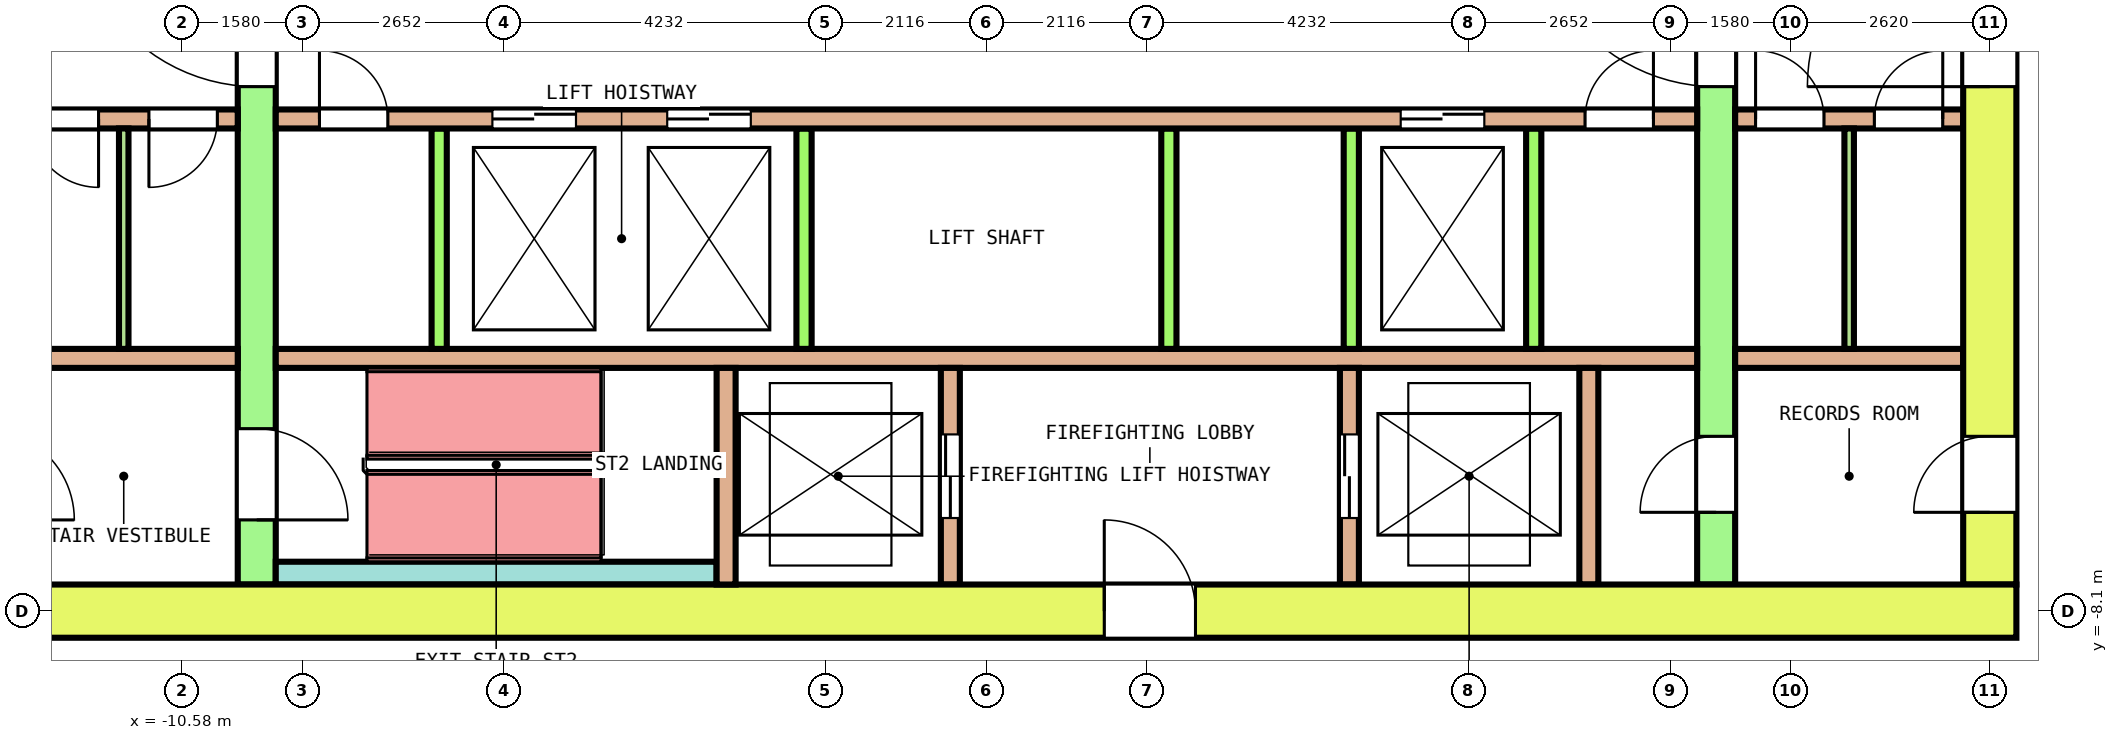
"""IFC4 building model, lengths in metres.
Left out: names, types, materials, properties, quantities, classifications, styles, units other than length and angle.
Written with IfcOpenShell. Run it as: python <this file> out.ifc"""

import sys

from ifc_helpers import new_model, si_unit, direction, frame, frame_2d, origin, place, context, subcontext, project, spatial, rectangle, extrude, element, fill, save


model = new_model("IFC4")
c1 = context("Model", 3, precision=1e-05, world=origin(), true_north=direction((0.0, 1.0)))
c2 = subcontext(c1, "Body", "Model", "MODEL_VIEW")
j1 = project(units=[si_unit("LENGTHUNIT", "METRE"), si_unit("PLANEANGLEUNIT", "RADIAN")], contexts=[c1])
p1 = place(None, origin())
s1 = spatial("IfcSite", under=j1, at=p1, CompositionType="ELEMENT")
p2 = place(p1, origin())
s2 = spatial("IfcBuilding", under=s1, at=p2, CompositionType="ELEMENT")
p3 = place(p2, frame((0.0, 0.0, 198.0)))
s3 = spatial("IfcBuildingStorey", under=s2, at=p3, CompositionType="ELEMENT", Elevation=198.0)
p4 = place(p3, frame((-13.55, -8.1, 0.0), z_axis=(0.0, 0.0, 1.0), x_axis=(1.0, 0.0, 0.0)))
e1 = element("IfcWall", 1, at=p4, inside=s3, PredefinedType="SHEAR", context=c2, shape_type="SweptSolid", body=[
    extrude(rectangle(XDim=27.1, YDim=0.7, at=frame_2d((13.55, 0.0))), origin(), (0.0, 0.0, 1.0), 4.1),
])
p5 = place(p4, frame((15.1, 0.0, 0.0)))
e2 = element("IfcOpeningElement", 2, at=p5, cuts=e1, PredefinedType="OPENING", context=c2, shape_type="SweptSolid", body=[
    extrude(rectangle(XDim=1.2, YDim=2.1, at=frame_2d((0.6, 1.05))), frame((0.0, 0.36, 0.0), z_axis=(0.0, -1.0, 0.0), x_axis=(1.0, 0.0, 0.0)), (0.0, 0.0, 1.0), 0.72),
])
p6 = place(p3, frame((13.2, -7.75, 0.0), z_axis=(0.0, 0.0, 1.0), x_axis=(0.0, 1.0, 0.0)))
e3 = element("IfcWall", 3, at=p6, inside=s3, PredefinedType="SHEAR", context=c2, shape_type="SweptSolid", body=[
    extrude(rectangle(XDim=15.5, YDim=0.7, at=frame_2d((7.75, 0.0))), origin(), (0.0, 0.0, 1.0), 4.1),
])
p7 = place(p6, frame((6.55, 0.0, 0.0)))
e4 = element("IfcOpeningElement", 4, at=p7, cuts=e3, PredefinedType="OPENING", context=c2, shape_type="SweptSolid", body=[
    extrude(rectangle(XDim=2.4, YDim=2.1, at=frame_2d((1.2, 1.05))), frame((0.0, 0.36, 0.0), z_axis=(0.0, -1.0, 0.0), x_axis=(1.0, 0.0, 0.0)), (0.0, 0.0, 1.0), 0.72),
])
p8 = place(p6, frame((13.45, 0.0, 0.0)))
e5 = element("IfcOpeningElement", 5, at=p8, cuts=e3, PredefinedType="OPENING", context=c2, shape_type="SweptSolid", body=[
    extrude(rectangle(XDim=1.2, YDim=2.1, at=frame_2d((0.6, 1.05))), frame((0.0, 0.36, 0.0), z_axis=(0.0, -1.0, 0.0), x_axis=(1.0, 0.0, 0.0)), (0.0, 0.0, 1.0), 0.72),
])
p9 = place(p6, frame((0.95, 0.0, 0.0)))
e6 = element("IfcOpeningElement", 6, at=p9, cuts=e3, PredefinedType="OPENING", context=c2, shape_type="SweptSolid", body=[
    extrude(rectangle(XDim=1.0, YDim=2.1, at=frame_2d((0.5, 1.05))), frame((0.0, 0.36, 0.0), z_axis=(0.0, -1.0, 0.0), x_axis=(1.0, 0.0, 0.0)), (0.0, 0.0, 1.0), 0.72),
])
p10 = place(p3, frame((-9.6, -7.75, 0.0), z_axis=(0.0, 0.0, 1.0), x_axis=(0.0, 1.0, 0.0)))
e7 = element("IfcWall", 7, at=p10, inside=s3, PredefinedType="SHEAR", context=c2, shape_type="SweptSolid", body=[
    extrude(rectangle(XDim=15.5, YDim=0.5, at=frame_2d((7.75, 0.0))), origin(), (0.0, 0.0, 1.0), 4.1),
])
p11 = place(p10, frame((6.55, 0.0, 0.0)))
e8 = element("IfcOpeningElement", 8, at=p11, cuts=e7, PredefinedType="OPENING", context=c2, shape_type="SweptSolid", body=[
    extrude(rectangle(XDim=2.4, YDim=2.1, at=frame_2d((1.2, 1.05))), frame((0.0, 0.26, 0.0), z_axis=(0.0, -1.0, 0.0), x_axis=(1.0, 0.0, 0.0)), (0.0, 0.0, 1.0), 0.52),
])
p12 = place(p10, frame((13.45, 0.0, 0.0)))
e9 = element("IfcOpeningElement", 9, at=p12, cuts=e7, PredefinedType="OPENING", context=c2, shape_type="SweptSolid", body=[
    extrude(rectangle(XDim=1.2, YDim=2.1, at=frame_2d((0.6, 1.05))), frame((0.0, 0.26, 0.0), z_axis=(0.0, -1.0, 0.0), x_axis=(1.0, 0.0, 0.0)), (0.0, 0.0, 1.0), 0.52),
])
p13 = place(p10, frame((0.85, 0.0, 0.0)))
e10 = element("IfcOpeningElement", 10, at=p13, cuts=e7, PredefinedType="OPENING", context=c2, shape_type="SweptSolid", body=[
    extrude(rectangle(XDim=1.2, YDim=2.1, at=frame_2d((0.6, 1.05))), frame((0.0, 0.26, 0.0), z_axis=(0.0, -1.0, 0.0), x_axis=(1.0, 0.0, 0.0)), (0.0, 0.0, 1.0), 0.52),
])
p14 = place(p3, frame((9.6, -7.75, 0.0), z_axis=(0.0, 0.0, 1.0), x_axis=(0.0, 1.0, 0.0)))
e11 = element("IfcWall", 11, at=p14, inside=s3, PredefinedType="SHEAR", context=c2, shape_type="SweptSolid", body=[
    extrude(rectangle(XDim=15.5, YDim=0.5, at=frame_2d((7.75, 0.0))), origin(), (0.0, 0.0, 1.0), 4.1),
])
p15 = place(p14, frame((6.55, 0.0, 0.0)))
e12 = element("IfcOpeningElement", 12, at=p15, cuts=e11, PredefinedType="OPENING", context=c2, shape_type="SweptSolid", body=[
    extrude(rectangle(XDim=2.4, YDim=2.1, at=frame_2d((1.2, 1.05))), frame((0.0, 0.26, 0.0), z_axis=(0.0, -1.0, 0.0), x_axis=(1.0, 0.0, 0.0)), (0.0, 0.0, 1.0), 0.52),
])
p16 = place(p14, frame((13.45, 0.0, 0.0)))
e13 = element("IfcOpeningElement", 13, at=p16, cuts=e11, PredefinedType="OPENING", context=c2, shape_type="SweptSolid", body=[
    extrude(rectangle(XDim=1.2, YDim=2.1, at=frame_2d((0.6, 1.05))), frame((0.0, 0.26, 0.0), z_axis=(0.0, -1.0, 0.0), x_axis=(1.0, 0.0, 0.0)), (0.0, 0.0, 1.0), 0.52),
])
p17 = place(p14, frame((0.95, 0.0, 0.0)))
e14 = element("IfcOpeningElement", 14, at=p17, cuts=e11, PredefinedType="OPENING", context=c2, shape_type="SweptSolid", body=[
    extrude(rectangle(XDim=1.0, YDim=2.1, at=frame_2d((0.5, 1.05))), frame((0.0, 0.26, 0.0), z_axis=(0.0, -1.0, 0.0), x_axis=(1.0, 0.0, 0.0)), (0.0, 0.0, 1.0), 0.52),
])
p18 = place(p3, frame((-12.85, -1.625, 0.0), z_axis=(0.0, 0.0, 1.0), x_axis=(1.0, 0.0, 0.0)))
e15 = element("IfcWall", 15, at=p18, inside=s3, PredefinedType="SOLIDWALL", context=c2, shape_type="SweptSolid", body=[
    extrude(rectangle(XDim=3.0, YDim=0.25, at=frame_2d((1.5, 0.0))), origin(), (0.0, 0.0, 1.0), 4.1),
])
p19 = place(p18, frame((0.269, 0.0, 0.0)))
e16 = element("IfcOpeningElement", 16, at=p19, cuts=e15, PredefinedType="OPENING", context=c2, shape_type="SweptSolid", body=[
    extrude(rectangle(XDim=0.9, YDim=2.1, at=frame_2d((0.45, 1.05))), frame((0.0, 0.135, 0.0), z_axis=(0.0, -1.0, 0.0), x_axis=(1.0, 0.0, 0.0)), (0.0, 0.0, 1.0), 0.27),
])
p20 = place(p18, frame((1.831, 0.0, 0.0)))
e17 = element("IfcOpeningElement", 17, at=p20, cuts=e15, PredefinedType="OPENING", context=c2, shape_type="SweptSolid", body=[
    extrude(rectangle(XDim=0.9, YDim=2.1, at=frame_2d((0.45, 1.05))), frame((0.0, 0.135, 0.0), z_axis=(0.0, -1.0, 0.0), x_axis=(1.0, 0.0, 0.0)), (0.0, 0.0, 1.0), 0.27),
])
p21 = place(p3, frame((-9.35, -1.625, 0.0), z_axis=(0.0, 0.0, 1.0), x_axis=(1.0, 0.0, 0.0)))
e18 = element("IfcWall", 18, at=p21, inside=s3, PredefinedType="SOLIDWALL", context=c2, shape_type="SweptSolid", body=[
    extrude(rectangle(XDim=18.7, YDim=0.25, at=frame_2d((9.35, 0.0))), origin(), (0.0, 0.0, 1.0), 4.1),
])
p22 = place(p21, frame((2.85, 0.0, 0.0)))
e19 = element("IfcOpeningElement", 19, at=p22, cuts=e18, PredefinedType="OPENING", context=c2, shape_type="SweptSolid", body=[
    extrude(rectangle(XDim=1.1, YDim=2.1, at=frame_2d((0.55, 1.05))), frame((0.0, 0.135, 0.0), z_axis=(0.0, -1.0, 0.0), x_axis=(1.0, 0.0, 0.0)), (0.0, 0.0, 1.0), 0.27),
])
p23 = place(p21, frame((5.15, 0.0, 0.0)))
e20 = element("IfcOpeningElement", 20, at=p23, cuts=e18, PredefinedType="OPENING", context=c2, shape_type="SweptSolid", body=[
    extrude(rectangle(XDim=1.1, YDim=2.1, at=frame_2d((0.55, 1.05))), frame((0.0, 0.135, 0.0), z_axis=(0.0, -1.0, 0.0), x_axis=(1.0, 0.0, 0.0)), (0.0, 0.0, 1.0), 0.27),
])
p24 = place(p21, frame((14.8, 0.0, 0.0)))
e21 = element("IfcOpeningElement", 21, at=p24, cuts=e18, PredefinedType="OPENING", context=c2, shape_type="SweptSolid", body=[
    extrude(rectangle(XDim=1.1, YDim=2.1, at=frame_2d((0.55, 1.05))), frame((0.0, 0.135, 0.0), z_axis=(0.0, -1.0, 0.0), x_axis=(1.0, 0.0, 0.0)), (0.0, 0.0, 1.0), 0.27),
])
p25 = place(p21, frame((0.575, 0.0, 0.0)))
e22 = element("IfcOpeningElement", 22, at=p25, cuts=e18, PredefinedType="OPENING", context=c2, shape_type="SweptSolid", body=[
    extrude(rectangle(XDim=0.9, YDim=2.1, at=frame_2d((0.45, 1.05))), frame((0.0, 0.135, 0.0), z_axis=(0.0, -1.0, 0.0), x_axis=(1.0, 0.0, 0.0)), (0.0, 0.0, 1.0), 0.27),
])
p26 = place(p21, frame((17.225, 0.0, 0.0)))
e23 = element("IfcOpeningElement", 23, at=p26, cuts=e18, PredefinedType="OPENING", context=c2, shape_type="SweptSolid", body=[
    extrude(rectangle(XDim=0.9, YDim=2.1, at=frame_2d((0.45, 1.05))), frame((0.0, 0.135, 0.0), z_axis=(0.0, -1.0, 0.0), x_axis=(1.0, 0.0, 0.0)), (0.0, 0.0, 1.0), 0.27),
])
p27 = place(p3, frame((9.85, -1.625, 0.0), z_axis=(0.0, 0.0, 1.0), x_axis=(1.0, 0.0, 0.0)))
e24 = element("IfcWall", 24, at=p27, inside=s3, PredefinedType="SOLIDWALL", context=c2, shape_type="SweptSolid", body=[
    extrude(rectangle(XDim=3.0, YDim=0.25, at=frame_2d((1.5, 0.0))), origin(), (0.0, 0.0, 1.0), 4.1),
])
p28 = place(p27, frame((0.269, 0.0, 0.0)))
e25 = element("IfcOpeningElement", 25, at=p28, cuts=e24, PredefinedType="OPENING", context=c2, shape_type="SweptSolid", body=[
    extrude(rectangle(XDim=0.9, YDim=2.1, at=frame_2d((0.45, 1.05))), frame((0.0, 0.135, 0.0), z_axis=(0.0, -1.0, 0.0), x_axis=(1.0, 0.0, 0.0)), (0.0, 0.0, 1.0), 0.27),
])
p29 = place(p27, frame((1.831, 0.0, 0.0)))
e26 = element("IfcOpeningElement", 26, at=p29, cuts=e24, PredefinedType="OPENING", context=c2, shape_type="SweptSolid", body=[
    extrude(rectangle(XDim=0.9, YDim=2.1, at=frame_2d((0.45, 1.05))), frame((0.0, 0.135, 0.0), z_axis=(0.0, -1.0, 0.0), x_axis=(1.0, 0.0, 0.0)), (0.0, 0.0, 1.0), 0.27),
])
p30 = place(p3, frame((-12.85, -4.775, 0.0), z_axis=(0.0, 0.0, 1.0), x_axis=(1.0, 0.0, 0.0)))
e27 = element("IfcWall", 27, at=p30, inside=s3, PredefinedType="SOLIDWALL", context=c2, shape_type="SweptSolid", body=[
    extrude(rectangle(XDim=3.0, YDim=0.25, at=frame_2d((1.5, 0.0))), origin(), (0.0, 0.0, 1.0), 4.1),
])
p31 = place(p3, frame((-9.35, -4.775, 0.0), z_axis=(0.0, 0.0, 1.0), x_axis=(1.0, 0.0, 0.0)))
e28 = element("IfcWall", 28, at=p31, inside=s3, PredefinedType="SOLIDWALL", context=c2, shape_type="SweptSolid", body=[
    extrude(rectangle(XDim=18.7, YDim=0.25, at=frame_2d((9.35, 0.0))), origin(), (0.0, 0.0, 1.0), 4.1),
])
p32 = place(p3, frame((9.85, -4.775, 0.0), z_axis=(0.0, 0.0, 1.0), x_axis=(1.0, 0.0, 0.0)))
e29 = element("IfcWall", 29, at=p32, inside=s3, PredefinedType="SOLIDWALL", context=c2, shape_type="SweptSolid", body=[
    extrude(rectangle(XDim=3.0, YDim=0.25, at=frame_2d((1.5, 0.0))), origin(), (0.0, 0.0, 1.0), 4.1),
])
for number, where, z_axis, x_axis in (
    (30, (-7.2, -4.65, 0.0), (0.0, 0.0, 1.0), (0.0, 1.0, 0.0)),
    (31, (-2.4, -4.65, 0.0), (0.0, 0.0, 1.0), (0.0, 1.0, 0.0)),
    (32, (2.4, -4.65, 0.0), (0.0, 0.0, 1.0), (0.0, 1.0, 0.0)),
    (33, (4.8, -4.65, 0.0), (0.0, 0.0, 1.0), (0.0, 1.0, 0.0)),
    (34, (7.2, -4.65, 0.0), (0.0, 0.0, 1.0), (0.0, 1.0, 0.0)),
):
    element("IfcWall", number, at=place(p3, frame(where, z_axis=z_axis, x_axis=x_axis)), inside=s3, PredefinedType="SOLIDWALL", context=c2, shape_type="SweptSolid", body=[
        extrude(rectangle(XDim=2.9, YDim=0.2, at=frame_2d((1.45, 0.0))), origin(), (0.0, 0.0, 1.0), 4.1),
    ])
p33 = place(p3, frame((-9.35, -7.6, 0.0), z_axis=(0.0, 0.0, 1.0), x_axis=(1.0, 0.0, 0.0)))
e35 = element("IfcWall", 35, at=p33, inside=s3, PredefinedType="SOLIDWALL", context=c2, shape_type="SweptSolid", body=[
    extrude(rectangle(XDim=5.8, YDim=0.3, at=frame_2d((2.9, 0.0))), origin(), (0.0, 0.0, 1.0), 4.1),
])
p34 = place(p3, frame((-3.425, -7.75, 0.0), z_axis=(0.0, 0.0, 1.0), x_axis=(0.0, 1.0, 0.0)))
e36 = element("IfcWall", 36, at=p34, inside=s3, PredefinedType="SOLIDWALL", context=c2, shape_type="SweptSolid", body=[
    extrude(rectangle(XDim=2.85, YDim=0.25, at=frame_2d((1.425, 0.0))), origin(), (0.0, 0.0, 1.0), 4.1),
])
p35 = place(p3, frame((-0.475, -7.75, 0.0), z_axis=(0.0, 0.0, 1.0), x_axis=(0.0, 1.0, 0.0)))
e37 = element("IfcWall", 37, at=p35, inside=s3, PredefinedType="SOLIDWALL", context=c2, shape_type="SweptSolid", body=[
    extrude(rectangle(XDim=2.85, YDim=0.25, at=frame_2d((1.425, 0.0))), origin(), (0.0, 0.0, 1.0), 4.1),
])
p36 = place(p35, frame((0.875, 0.0, 0.0)))
e38 = element("IfcOpeningElement", 38, at=p36, cuts=e37, PredefinedType="OPENING", context=c2, shape_type="SweptSolid", body=[
    extrude(rectangle(XDim=1.1, YDim=2.1, at=frame_2d((0.55, 1.05))), frame((0.0, 0.135, 0.0), z_axis=(0.0, -1.0, 0.0), x_axis=(1.0, 0.0, 0.0)), (0.0, 0.0, 1.0), 0.27),
])
p37 = place(p3, frame((4.775, -7.75, 0.0), z_axis=(0.0, 0.0, 1.0), x_axis=(0.0, 1.0, 0.0)))
e39 = element("IfcWall", 39, at=p37, inside=s3, PredefinedType="SOLIDWALL", context=c2, shape_type="SweptSolid", body=[
    extrude(rectangle(XDim=2.85, YDim=0.25, at=frame_2d((1.425, 0.0))), origin(), (0.0, 0.0, 1.0), 4.1),
])
p38 = place(p37, frame((0.875, 0.0, 0.0)))
e40 = element("IfcOpeningElement", 40, at=p38, cuts=e39, PredefinedType="OPENING", context=c2, shape_type="SweptSolid", body=[
    extrude(rectangle(XDim=1.1, YDim=2.1, at=frame_2d((0.55, 1.05))), frame((0.0, 0.135, 0.0), z_axis=(0.0, -1.0, 0.0), x_axis=(1.0, 0.0, 0.0)), (0.0, 0.0, 1.0), 0.27),
])
p39 = place(p3, frame((7.925, -7.75, 0.0), z_axis=(0.0, 0.0, 1.0), x_axis=(0.0, 1.0, 0.0)))
e41 = element("IfcWall", 41, at=p39, inside=s3, PredefinedType="SOLIDWALL", context=c2, shape_type="SweptSolid", body=[
    extrude(rectangle(XDim=2.85, YDim=0.25, at=frame_2d((1.425, 0.0))), origin(), (0.0, 0.0, 1.0), 4.1),
])
for number, where, z_axis, x_axis in (
    (42, (-11.35, -4.65, 0.0), (0.0, 0.0, 1.0), (0.0, 1.0, 0.0)),
    (43, (11.35, -4.65, 0.0), (0.0, 0.0, 1.0), (0.0, 1.0, 0.0)),
):
    element("IfcWall", number, at=place(p3, frame(where, z_axis=z_axis, x_axis=x_axis)), inside=s3, PredefinedType="PARTITIONING", context=c2, shape_type="SweptSolid", body=[
        extrude(rectangle(XDim=2.9, YDim=0.125, at=frame_2d((1.45, 0.0))), origin(), (0.0, 0.0, 1.0), 4.1),
    ])
p40 = place(p22, origin())
e44 = element("IfcDoor", 44, at=p40, inside=s3, OperationType="DOUBLE_DOOR_SLIDING", PredefinedType="DOOR", context=c2, shape_type="SweptSolid", body=[
    extrude(rectangle(XDim=1.1, YDim=2.1, at=frame_2d((0.55, 1.05))), frame((0.0, 0.075, 0.0), z_axis=(0.0, -1.0, 0.0), x_axis=(1.0, 0.0, 0.0)), (0.0, 0.0, 1.0), 0.15),
])
fill(e19, e44)
p41 = place(p23, origin())
e45 = element("IfcDoor", 45, at=p41, inside=s3, OperationType="DOUBLE_DOOR_SLIDING", PredefinedType="DOOR", context=c2, shape_type="SweptSolid", body=[
    extrude(rectangle(XDim=1.1, YDim=2.1, at=frame_2d((0.55, 1.05))), frame((0.0, 0.075, 0.0), z_axis=(0.0, -1.0, 0.0), x_axis=(1.0, 0.0, 0.0)), (0.0, 0.0, 1.0), 0.15),
])
fill(e20, e45)
p42 = place(p24, origin())
e46 = element("IfcDoor", 46, at=p42, inside=s3, OperationType="DOUBLE_DOOR_SLIDING", PredefinedType="DOOR", context=c2, shape_type="SweptSolid", body=[
    extrude(rectangle(XDim=1.1, YDim=2.1, at=frame_2d((0.55, 1.05))), frame((0.0, 0.075, 0.0), z_axis=(0.0, -1.0, 0.0), x_axis=(1.0, 0.0, 0.0)), (0.0, 0.0, 1.0), 0.15),
])
fill(e21, e46)
p43 = place(p36, origin())
e47 = element("IfcDoor", 47, at=p43, inside=s3, OperationType="DOUBLE_DOOR_SLIDING", PredefinedType="DOOR", context=c2, shape_type="SweptSolid", body=[
    extrude(rectangle(XDim=1.1, YDim=2.1, at=frame_2d((0.55, 1.05))), frame((0.0, 0.075, 0.0), z_axis=(0.0, -1.0, 0.0), x_axis=(1.0, 0.0, 0.0)), (0.0, 0.0, 1.0), 0.15),
])
fill(e38, e47)
p44 = place(p38, origin())
e48 = element("IfcDoor", 48, at=p44, inside=s3, OperationType="DOUBLE_DOOR_SLIDING", PredefinedType="DOOR", context=c2, shape_type="SweptSolid", body=[
    extrude(rectangle(XDim=1.1, YDim=2.1, at=frame_2d((0.55, 1.05))), frame((0.0, 0.075, 0.0), z_axis=(0.0, -1.0, 0.0), x_axis=(1.0, 0.0, 0.0)), (0.0, 0.0, 1.0), 0.15),
])
fill(e40, e48)
p45 = place(p11, origin())
e49 = element("IfcDoor", 49, at=p45, inside=s3, OperationType="DOUBLE_DOOR_SINGLE_SWING", PredefinedType="DOOR", context=c2, shape_type="SweptSolid", body=[
    extrude(rectangle(XDim=2.4, YDim=2.1, at=frame_2d((1.2, 1.05))), frame((0.0, 0.2, 0.0), z_axis=(0.0, -1.0, 0.0), x_axis=(1.0, 0.0, 0.0)), (0.0, 0.0, 1.0), 0.4),
])
fill(e8, e49)
p46 = place(p15, origin())
e50 = element("IfcDoor", 50, at=p46, inside=s3, OperationType="DOUBLE_DOOR_SINGLE_SWING", PredefinedType="DOOR", context=c2, shape_type="SweptSolid", body=[
    extrude(rectangle(XDim=2.4, YDim=2.1, at=frame_2d((1.2, 1.05))), frame((0.0, 0.2, 0.0), z_axis=(0.0, -1.0, 0.0), x_axis=(1.0, 0.0, 0.0)), (0.0, 0.0, 1.0), 0.4),
])
fill(e12, e50)
p47 = place(p7, origin())
e51 = element("IfcDoor", 51, at=p47, inside=s3, OperationType="DOUBLE_DOOR_SINGLE_SWING", PredefinedType="DOOR", context=c2, shape_type="SweptSolid", body=[
    extrude(rectangle(XDim=2.4, YDim=2.1, at=frame_2d((1.2, 1.05))), frame((0.0, 0.3, 0.0), z_axis=(0.0, -1.0, 0.0), x_axis=(1.0, 0.0, 0.0)), (0.0, 0.0, 1.0), 0.6),
])
fill(e4, e51)
p48 = place(p13, origin())
e52 = element("IfcDoor", 52, at=p48, inside=s3, OperationType="SINGLE_SWING_RIGHT", PredefinedType="DOOR", context=c2, shape_type="SweptSolid", body=[
    extrude(rectangle(XDim=1.2, YDim=2.1, at=frame_2d((0.6, 1.05))), frame((0.0, 0.2, 0.0), z_axis=(0.0, -1.0, 0.0), x_axis=(1.0, 0.0, 0.0)), (0.0, 0.0, 1.0), 0.4),
])
fill(e10, e52)
p49 = place(p5, origin())
e53 = element("IfcDoor", 53, at=p49, inside=s3, OperationType="SINGLE_SWING_RIGHT", PredefinedType="DOOR", context=c2, shape_type="SweptSolid", body=[
    extrude(rectangle(XDim=1.2, YDim=2.1, at=frame_2d((0.6, 1.05))), frame((0.0, 0.3, 0.0), z_axis=(0.0, -1.0, 0.0), x_axis=(1.0, 0.0, 0.0)), (0.0, 0.0, 1.0), 0.6),
])
fill(e2, e53)
p50 = place(p17, origin())
e54 = element("IfcDoor", 54, at=p50, inside=s3, OperationType="SINGLE_SWING_RIGHT", PredefinedType="DOOR", context=c2, shape_type="SweptSolid", body=[
    extrude(rectangle(XDim=1.0, YDim=2.1, at=frame_2d((0.5, 1.05))), frame((0.0, 0.2, 0.0), z_axis=(0.0, -1.0, 0.0), x_axis=(1.0, 0.0, 0.0)), (0.0, 0.0, 1.0), 0.4),
])
fill(e14, e54)
p51 = place(p9, origin())
e55 = element("IfcDoor", 55, at=p51, inside=s3, OperationType="SINGLE_SWING_LEFT", PredefinedType="DOOR", context=c2, shape_type="SweptSolid", body=[
    extrude(rectangle(XDim=1.0, YDim=2.1, at=frame_2d((0.5, 1.05))), frame((0.0, 0.3, 0.0), z_axis=(0.0, -1.0, 0.0), x_axis=(1.0, 0.0, 0.0)), (0.0, 0.0, 1.0), 0.6),
])
fill(e6, e55)
p52 = place(p19, origin())
e56 = element("IfcDoor", 56, at=p52, inside=s3, OperationType="SINGLE_SWING_RIGHT", PredefinedType="DOOR", context=c2, shape_type="SweptSolid", body=[
    extrude(rectangle(XDim=0.9, YDim=2.1, at=frame_2d((0.45, 1.05))), frame((0.0, 0.075, 0.0), z_axis=(0.0, -1.0, 0.0), x_axis=(1.0, 0.0, 0.0)), (0.0, 0.0, 1.0), 0.15),
])
fill(e16, e56)
p53 = place(p20, origin())
e57 = element("IfcDoor", 57, at=p53, inside=s3, OperationType="SINGLE_SWING_LEFT", PredefinedType="DOOR", context=c2, shape_type="SweptSolid", body=[
    extrude(rectangle(XDim=0.9, YDim=2.1, at=frame_2d((0.45, 1.05))), frame((0.0, 0.075, 0.0), z_axis=(0.0, -1.0, 0.0), x_axis=(1.0, 0.0, 0.0)), (0.0, 0.0, 1.0), 0.15),
])
fill(e17, e57)
p54 = place(p25, origin())
e58 = element("IfcDoor", 58, at=p54, inside=s3, OperationType="SINGLE_SWING_RIGHT", PredefinedType="DOOR", context=c2, shape_type="SweptSolid", body=[
    extrude(rectangle(XDim=0.9, YDim=2.1, at=frame_2d((0.45, 1.05))), frame((0.0, 0.075, 0.0), z_axis=(0.0, -1.0, 0.0), x_axis=(1.0, 0.0, 0.0)), (0.0, 0.0, 1.0), 0.15),
])
fill(e22, e58)
p55 = place(p26, origin())
e59 = element("IfcDoor", 59, at=p55, inside=s3, OperationType="SINGLE_SWING_LEFT", PredefinedType="DOOR", context=c2, shape_type="SweptSolid", body=[
    extrude(rectangle(XDim=0.9, YDim=2.1, at=frame_2d((0.45, 1.05))), frame((0.0, 0.075, 0.0), z_axis=(0.0, -1.0, 0.0), x_axis=(1.0, 0.0, 0.0)), (0.0, 0.0, 1.0), 0.15),
])
fill(e23, e59)
p56 = place(p28, origin())
e60 = element("IfcDoor", 60, at=p56, inside=s3, OperationType="SINGLE_SWING_RIGHT", PredefinedType="DOOR", context=c2, shape_type="SweptSolid", body=[
    extrude(rectangle(XDim=0.9, YDim=2.1, at=frame_2d((0.45, 1.05))), frame((0.0, 0.075, 0.0), z_axis=(0.0, -1.0, 0.0), x_axis=(1.0, 0.0, 0.0)), (0.0, 0.0, 1.0), 0.15),
])
fill(e25, e60)
p57 = place(p29, origin())
e61 = element("IfcDoor", 61, at=p57, inside=s3, OperationType="SINGLE_SWING_LEFT", PredefinedType="DOOR", context=c2, shape_type="SweptSolid", body=[
    extrude(rectangle(XDim=0.9, YDim=2.1, at=frame_2d((0.45, 1.05))), frame((0.0, 0.075, 0.0), z_axis=(0.0, -1.0, 0.0), x_axis=(1.0, 0.0, 0.0)), (0.0, 0.0, 1.0), 0.15),
])
fill(e26, e61)
save(model, sys.argv[1])
